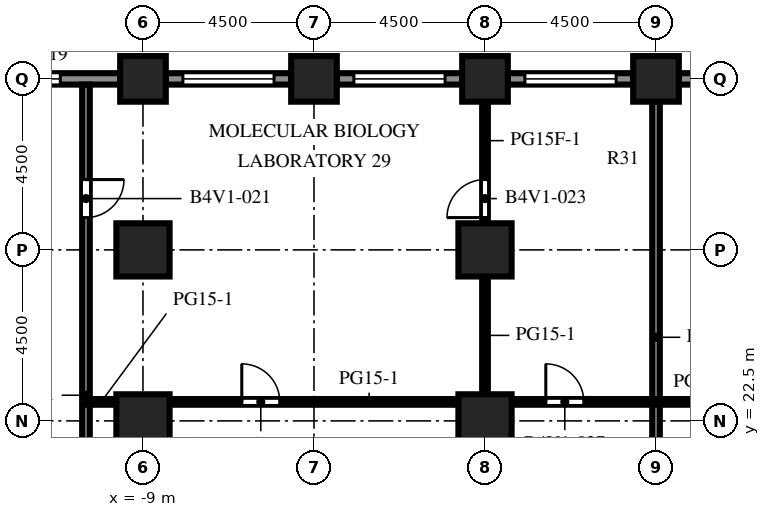
"""IFC4 building model, lengths in metres.
Left out: names, types, materials, properties, quantities, classifications, styles, units other than length and angle.
Written with IfcOpenShell. Run it as: python <this file> out.ifc"""

import sys

from ifc_helpers import new_model, si_unit, direction, frame, frame_2d, origin, origin_2d, place, context, subcontext, project, spatial, rectangle, extrude, element, fill, save


model = new_model("IFC4")
c1 = context("Model", 3, precision=1e-05, world=origin(), true_north=direction((0.0, 1.0)))
c2 = subcontext(c1, "Body", "Model", "MODEL_VIEW")
j1 = project(units=[si_unit("LENGTHUNIT", "METRE"), si_unit("PLANEANGLEUNIT", "RADIAN")], contexts=[c1])
p1 = place(None, origin())
s1 = spatial("IfcSite", under=j1, at=p1, CompositionType="ELEMENT")
p2 = place(p1, origin())
s2 = spatial("IfcBuilding", under=s1, at=p2, CompositionType="ELEMENT")
p3 = place(p2, frame((0.0, 0.0, 129.0)))
s3 = spatial("IfcBuildingStorey", under=s2, at=p3, CompositionType="ELEMENT", Elevation=129.0)
for number, where, z_axis, x_axis in (
    (1, (-9.0, 31.5, 0.0), (0.0, 0.0, 1.0), (1.0, 0.0, 0.0)),
    (2, (-4.5, 31.5, 0.0), (0.0, 0.0, 1.0), (1.0, 0.0, 0.0)),
    (3, (0.0, 31.5, 0.0), (0.0, 0.0, 1.0), (1.0, 0.0, 0.0)),
    (4, (4.5, 31.5, 0.0), (0.0, 0.0, 1.0), (1.0, 0.0, 0.0)),
):
    element("IfcColumn", number, at=place(p3, frame(where, z_axis=z_axis, x_axis=x_axis)), inside=s3, PredefinedType="COLUMN", context=c2, shape_type="SweptSolid", body=[
        extrude(rectangle(XDim=1.2, YDim=1.2, at=origin_2d()), origin(), (0.0, 0.0, 1.0), 4.1),
    ])
for number, where, z_axis, x_axis in (
    (5, (-9.0, 22.5, 0.0), (0.0, 0.0, 1.0), (1.0, 0.0, 0.0)),
    (6, (-9.0, 27.0, 0.0), (0.0, 0.0, 1.0), (1.0, 0.0, 0.0)),
    (7, (0.0, 22.5, 0.0), (0.0, 0.0, 1.0), (1.0, 0.0, 0.0)),
    (8, (0.0, 27.0, 0.0), (0.0, 0.0, 1.0), (1.0, 0.0, 0.0)),
):
    element("IfcColumn", number, at=place(p3, frame(where, z_axis=z_axis, x_axis=x_axis)), inside=s3, PredefinedType="COLUMN", context=c2, shape_type="SweptSolid", body=[
        extrude(rectangle(XDim=1.4, YDim=1.4, at=origin_2d()), origin(), (0.0, 0.0, 1.0), 4.1),
    ])
p4 = place(p3, frame((5.1, 31.5, 0.0), z_axis=(0.0, 0.0, 1.0), x_axis=(1.0, 0.0, 0.0)))
e9 = element("IfcWall", 9, at=p4, inside=s3, PredefinedType="SOLIDWALL", context=c2, shape_type="SweptSolid", body=[
    extrude(rectangle(XDim=3.3, YDim=0.3, at=frame_2d((1.65, 0.0))), origin(), (0.0, 0.0, 1.0), 2.75),
])
p5 = place(p4, frame((0.45, 0.0, 0.8)))
e10 = element("IfcOpeningElement", 10, at=p5, cuts=e9, PredefinedType="OPENING", context=c2, shape_type="SweptSolid", body=[
    extrude(rectangle(XDim=2.4, YDim=1.7, at=frame_2d((1.2, 0.85))), frame((0.0, 0.16, 0.0), z_axis=(0.0, -1.0, 0.0), x_axis=(1.0, 0.0, 0.0)), (0.0, 0.0, 1.0), 0.32),
])
p6 = place(p3, frame((0.6, 31.5, 0.0), z_axis=(0.0, 0.0, 1.0), x_axis=(1.0, 0.0, 0.0)))
e11 = element("IfcWall", 11, at=p6, inside=s3, PredefinedType="SOLIDWALL", context=c2, shape_type="SweptSolid", body=[
    extrude(rectangle(XDim=3.3, YDim=0.3, at=frame_2d((1.65, 0.0))), origin(), (0.0, 0.0, 1.0), 2.75),
])
p7 = place(p6, frame((0.45, 0.0, 0.8)))
e12 = element("IfcOpeningElement", 12, at=p7, cuts=e11, PredefinedType="OPENING", context=c2, shape_type="SweptSolid", body=[
    extrude(rectangle(XDim=2.4, YDim=1.7, at=frame_2d((1.2, 0.85))), frame((0.0, 0.16, 0.0), z_axis=(0.0, -1.0, 0.0), x_axis=(1.0, 0.0, 0.0)), (0.0, 0.0, 1.0), 0.32),
])
p8 = place(p3, frame((-3.9, 31.5, 0.0), z_axis=(0.0, 0.0, 1.0), x_axis=(1.0, 0.0, 0.0)))
e13 = element("IfcWall", 13, at=p8, inside=s3, PredefinedType="SOLIDWALL", context=c2, shape_type="SweptSolid", body=[
    extrude(rectangle(XDim=3.3, YDim=0.3, at=frame_2d((1.65, 0.0))), origin(), (0.0, 0.0, 1.0), 2.75),
])
p9 = place(p8, frame((0.45, 0.0, 0.8)))
e14 = element("IfcOpeningElement", 14, at=p9, cuts=e13, PredefinedType="OPENING", context=c2, shape_type="SweptSolid", body=[
    extrude(rectangle(XDim=2.4, YDim=1.7, at=frame_2d((1.2, 0.85))), frame((0.0, 0.16, 0.0), z_axis=(0.0, -1.0, 0.0), x_axis=(1.0, 0.0, 0.0)), (0.0, 0.0, 1.0), 0.32),
])
p10 = place(p3, frame((-8.4, 31.5, 0.0), z_axis=(0.0, 0.0, 1.0), x_axis=(1.0, 0.0, 0.0)))
e15 = element("IfcWall", 15, at=p10, inside=s3, PredefinedType="SOLIDWALL", context=c2, shape_type="SweptSolid", body=[
    extrude(rectangle(XDim=3.3, YDim=0.3, at=frame_2d((1.65, 0.0))), origin(), (0.0, 0.0, 1.0), 2.75),
])
p11 = place(p10, frame((0.45, 0.0, 0.8)))
e16 = element("IfcOpeningElement", 16, at=p11, cuts=e15, PredefinedType="OPENING", context=c2, shape_type="SweptSolid", body=[
    extrude(rectangle(XDim=2.4, YDim=1.7, at=frame_2d((1.2, 0.85))), frame((0.0, 0.16, 0.0), z_axis=(0.0, -1.0, 0.0), x_axis=(1.0, 0.0, 0.0)), (0.0, 0.0, 1.0), 0.32),
])
p12 = place(p3, frame((-12.9, 31.5, 0.0), z_axis=(0.0, 0.0, 1.0), x_axis=(1.0, 0.0, 0.0)))
e17 = element("IfcWall", 17, at=p12, inside=s3, PredefinedType="SOLIDWALL", context=c2, shape_type="SweptSolid", body=[
    extrude(rectangle(XDim=3.3, YDim=0.3, at=frame_2d((1.65, 0.0))), origin(), (0.0, 0.0, 1.0), 2.75),
])
p13 = place(p12, frame((0.525, 0.0, 0.8)))
e18 = element("IfcOpeningElement", 18, at=p13, cuts=e17, PredefinedType="OPENING", context=c2, shape_type="SweptSolid", body=[
    extrude(rectangle(XDim=1.2, YDim=1.7, at=frame_2d((0.6, 0.85))), frame((0.0, 0.16, 0.0), z_axis=(0.0, -1.0, 0.0), x_axis=(1.0, 0.0, 0.0)), (0.0, 0.0, 1.0), 0.32),
])
p14 = place(p3, frame((-10.5, 31.35, 0.0), z_axis=(0.0, 0.0, 1.0), x_axis=(0.0, -1.0, 0.0)))
e19 = element("IfcWall", 19, at=p14, inside=s3, PredefinedType="PARTITIONING", context=c2, shape_type="SweptSolid", body=[
    extrude(rectangle(XDim=12.85, YDim=0.2, at=frame_2d((6.425, 0.0))), origin(), (0.0, 0.0, 1.0), 3.65),
])
p15 = place(p14, frame((2.5, 0.0, 0.0)))
e20 = element("IfcOpeningElement", 20, at=p15, cuts=e19, PredefinedType="OPENING", context=c2, shape_type="SweptSolid", body=[
    extrude(rectangle(XDim=1.0, YDim=2.1, at=frame_2d((0.5, 1.05))), frame((0.0, 0.11, 0.0), z_axis=(0.0, -1.0, 0.0), x_axis=(1.0, 0.0, 0.0)), (0.0, 0.0, 1.0), 0.22),
])
p16 = place(p3, frame((0.0, 23.2, 0.0), z_axis=(0.0, 0.0, 1.0), x_axis=(0.0, 1.0, 0.0)))
e21 = element("IfcWall", 21, at=p16, inside=s3, PredefinedType="PARTITIONING", context=c2, shape_type="SweptSolid", body=[
    extrude(rectangle(XDim=3.1, YDim=0.15, at=frame_2d((1.55, 0.0))), origin(), (0.0, 0.0, 1.0), 3.65),
])
p17 = place(p3, frame((0.0, 30.9, 0.0), z_axis=(0.0, 0.0, 1.0), x_axis=(0.0, -1.0, 0.0)))
e22 = element("IfcWall", 22, at=p17, inside=s3, PredefinedType="PARTITIONING", context=c2, shape_type="SweptSolid", body=[
    extrude(rectangle(XDim=3.2, YDim=0.15, at=frame_2d((1.6, 0.0))), origin(), (0.0, 0.0, 1.0), 3.65),
])
p18 = place(p17, frame((2.05, 0.0, 0.0)))
e23 = element("IfcOpeningElement", 23, at=p18, cuts=e22, PredefinedType="OPENING", context=c2, shape_type="SweptSolid", body=[
    extrude(rectangle(XDim=1.0, YDim=2.1, at=frame_2d((0.5, 1.05))), frame((0.0, 0.085, 0.0), z_axis=(0.0, -1.0, 0.0), x_axis=(1.0, 0.0, 0.0)), (0.0, 0.0, 1.0), 0.17),
])
p19 = place(p3, frame((4.5, 18.5, 0.0), z_axis=(0.0, 0.0, 1.0), x_axis=(0.0, 1.0, 0.0)))
e24 = element("IfcWall", 24, at=p19, inside=s3, PredefinedType="PARTITIONING", context=c2, shape_type="SweptSolid", body=[
    extrude(rectangle(XDim=12.4, YDim=0.2, at=frame_2d((6.2, 0.0))), origin(), (0.0, 0.0, 1.0), 3.65),
])
p20 = place(p3, frame((-10.5, 23.0, 0.0), z_axis=(0.0, 0.0, 1.0), x_axis=(1.0, 0.0, 0.0)))
e25 = element("IfcWall", 25, at=p20, inside=s3, PredefinedType="PARTITIONING", context=c2, shape_type="SweptSolid", body=[
    extrude(rectangle(XDim=0.8, YDim=0.15, at=frame_2d((0.4, 0.0))), origin(), (0.0, 0.0, 1.0), 3.65),
])
p21 = place(p3, frame((-0.7, 23.0, 0.0), z_axis=(0.0, 0.0, 1.0), x_axis=(-1.0, 0.0, 0.0)))
e26 = element("IfcWall", 26, at=p21, inside=s3, PredefinedType="PARTITIONING", context=c2, shape_type="SweptSolid", body=[
    extrude(rectangle(XDim=7.6, YDim=0.15, at=frame_2d((3.8, 0.0))), origin(), (0.0, 0.0, 1.0), 3.65),
])
p22 = place(p21, frame((4.7, 0.0, 0.0)))
e27 = element("IfcOpeningElement", 27, at=p22, cuts=e26, PredefinedType="OPENING", context=c2, shape_type="SweptSolid", body=[
    extrude(rectangle(XDim=1.0, YDim=2.1, at=frame_2d((0.5, 1.05))), frame((0.0, 0.085, 0.0), z_axis=(0.0, -1.0, 0.0), x_axis=(1.0, 0.0, 0.0)), (0.0, 0.0, 1.0), 0.17),
])
p23 = place(p3, frame((8.3, 23.0, 0.0), z_axis=(0.0, 0.0, 1.0), x_axis=(-1.0, 0.0, 0.0)))
e28 = element("IfcWall", 28, at=p23, inside=s3, PredefinedType="PARTITIONING", context=c2, shape_type="SweptSolid", body=[
    extrude(rectangle(XDim=7.6, YDim=0.15, at=frame_2d((3.8, 0.0))), origin(), (0.0, 0.0, 1.0), 3.65),
])
p24 = place(p23, frame((5.7, 0.0, 0.0)))
e29 = element("IfcOpeningElement", 29, at=p24, cuts=e28, PredefinedType="OPENING", context=c2, shape_type="SweptSolid", body=[
    extrude(rectangle(XDim=1.0, YDim=2.1, at=frame_2d((0.5, 1.05))), frame((0.0, 0.085, 0.0), z_axis=(0.0, -1.0, 0.0), x_axis=(1.0, 0.0, 0.0)), (0.0, 0.0, 1.0), 0.17),
])
p25 = place(p7, origin())
e30 = element("IfcWindow", 30, at=p25, inside=s3, PartitioningType="SINGLE_PANEL", PredefinedType="WINDOW", context=c2, shape_type="SweptSolid", body=[
    extrude(rectangle(XDim=2.4, YDim=1.7, at=frame_2d((1.2, 0.85))), frame((0.0, 0.03, 0.0), z_axis=(0.0, -1.0, 0.0), x_axis=(1.0, 0.0, 0.0)), (0.0, 0.0, 1.0), 0.06),
])
fill(e12, e30)
p26 = place(p9, origin())
e31 = element("IfcWindow", 31, at=p26, inside=s3, PartitioningType="SINGLE_PANEL", PredefinedType="WINDOW", context=c2, shape_type="SweptSolid", body=[
    extrude(rectangle(XDim=2.4, YDim=1.7, at=frame_2d((1.2, 0.85))), frame((0.0, 0.03, 0.0), z_axis=(0.0, -1.0, 0.0), x_axis=(1.0, 0.0, 0.0)), (0.0, 0.0, 1.0), 0.06),
])
fill(e14, e31)
p27 = place(p11, origin())
e32 = element("IfcWindow", 32, at=p27, inside=s3, PartitioningType="SINGLE_PANEL", PredefinedType="WINDOW", context=c2, shape_type="SweptSolid", body=[
    extrude(rectangle(XDim=2.4, YDim=1.7, at=frame_2d((1.2, 0.85))), frame((0.0, 0.03, 0.0), z_axis=(0.0, -1.0, 0.0), x_axis=(1.0, 0.0, 0.0)), (0.0, 0.0, 1.0), 0.06),
])
fill(e16, e32)
p28 = place(p13, origin())
e33 = element("IfcWindow", 33, at=p28, inside=s3, PartitioningType="SINGLE_PANEL", PredefinedType="WINDOW", context=c2, shape_type="SweptSolid", body=[
    extrude(rectangle(XDim=1.2, YDim=1.7, at=frame_2d((0.6, 0.85))), frame((0.0, 0.03, 0.0), z_axis=(0.0, -1.0, 0.0), x_axis=(1.0, 0.0, 0.0)), (0.0, 0.0, 1.0), 0.06),
])
fill(e18, e33)
p29 = place(p15, origin())
e34 = element("IfcDoor", 34, at=p29, inside=s3, OperationType="SINGLE_SWING_LEFT", PredefinedType="DOOR", context=c2, shape_type="SweptSolid", body=[
    extrude(rectangle(XDim=1.0, YDim=2.1, at=frame_2d((0.5, 1.05))), frame((0.0, 0.025, 0.0), z_axis=(0.0, -1.0, 0.0), x_axis=(1.0, 0.0, 0.0)), (0.0, 0.0, 1.0), 0.05),
])
fill(e20, e34)
p30 = place(p18, origin())
e35 = element("IfcDoor", 35, at=p30, inside=s3, OperationType="SINGLE_SWING_RIGHT", PredefinedType="DOOR", context=c2, shape_type="SweptSolid", body=[
    extrude(rectangle(XDim=1.0, YDim=2.1, at=frame_2d((0.5, 1.05))), frame((0.0, 0.025, 0.0), z_axis=(0.0, -1.0, 0.0), x_axis=(1.0, 0.0, 0.0)), (0.0, 0.0, 1.0), 0.05),
])
fill(e23, e35)
p31 = place(p22, origin())
e36 = element("IfcDoor", 36, at=p31, inside=s3, OperationType="SINGLE_SWING_RIGHT", PredefinedType="DOOR", context=c2, shape_type="SweptSolid", body=[
    extrude(rectangle(XDim=1.0, YDim=2.1, at=frame_2d((0.5, 1.05))), frame((0.0, 0.025, 0.0), z_axis=(0.0, -1.0, 0.0), x_axis=(1.0, 0.0, 0.0)), (0.0, 0.0, 1.0), 0.05),
])
fill(e27, e36)
p32 = place(p24, origin())
e37 = element("IfcDoor", 37, at=p32, inside=s3, OperationType="SINGLE_SWING_RIGHT", PredefinedType="DOOR", context=c2, shape_type="SweptSolid", body=[
    extrude(rectangle(XDim=1.0, YDim=2.1, at=frame_2d((0.5, 1.05))), frame((0.0, 0.025, 0.0), z_axis=(0.0, -1.0, 0.0), x_axis=(1.0, 0.0, 0.0)), (0.0, 0.0, 1.0), 0.05),
])
fill(e29, e37)
save(model, sys.argv[1])
